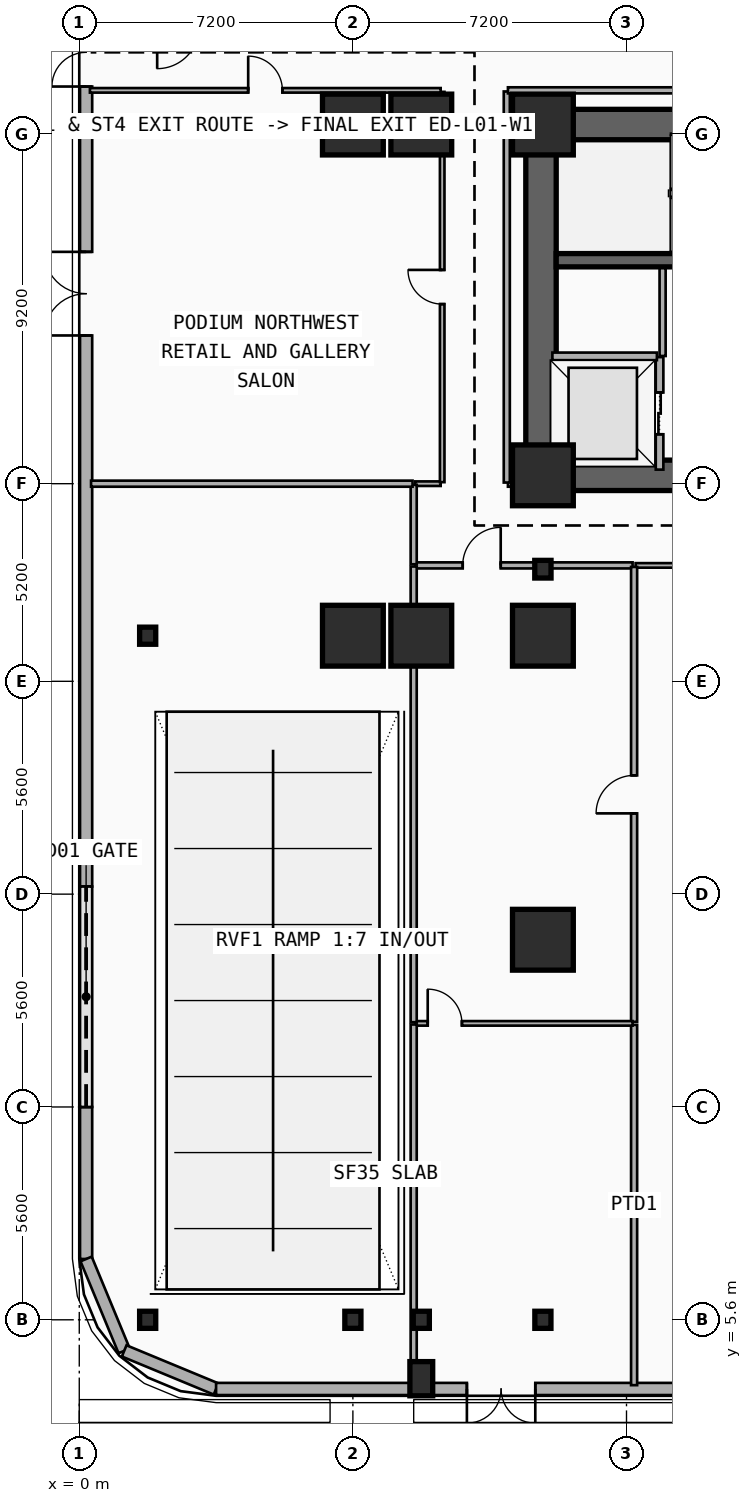
"""IFC4 building model, lengths in metres.
Left out: names, types, materials, properties, quantities, classifications, styles, units other than length and angle.
Written with IfcOpenShell. Run it as: python <this file> out.ifc"""

import sys

from ifc_helpers import new_model, si_unit, direction, frame, frame_2d, origin, origin_2d, place, context, subcontext, project, spatial, rectangle, i_section, extrude, element, fill, save


model = new_model("IFC4")
c1 = context("Model", 3, precision=1e-05, world=origin(), true_north=direction((0.0, 1.0)))
c2 = subcontext(c1, "Body", "Model", "MODEL_VIEW")
j1 = project(units=[si_unit("LENGTHUNIT", "METRE"), si_unit("PLANEANGLEUNIT", "RADIAN")], contexts=[c1])
p1 = place(None, origin())
s1 = spatial("IfcSite", under=j1, at=p1, CompositionType="ELEMENT")
p2 = place(p1, origin())
s2 = spatial("IfcBuilding", under=s1, at=p2, CompositionType="ELEMENT")
p3 = place(p2, origin())
s3 = spatial("IfcBuildingStorey", under=s2, at=p3, CompositionType="ELEMENT", Elevation=0.0)
p4 = place(p3, frame((12.15, 37.05, 0.0), z_axis=(0.0, 0.0, 1.0), x_axis=(1.0, 0.0, 0.0)))
e1 = element("IfcWall", 1, at=p4, inside=s3, PredefinedType="SHEAR", context=c2, shape_type="SweptSolid", body=[
    extrude(rectangle(XDim=33.23, YDim=0.8, at=frame_2d((16.615, 0.0))), origin(), (0.0, 0.0, 1.0), 5.4),
])
p5 = place(p3, frame((21.18, 27.82, 0.0), z_axis=(0.0, 0.0, 1.0), x_axis=(-1.0, 0.0, 0.0)))
e2 = element("IfcWall", 2, at=p5, inside=s3, PredefinedType="SHEAR", context=c2, shape_type="SweptSolid", body=[
    extrude(rectangle(XDim=9.03, YDim=0.8, at=frame_2d((4.515, 0.0))), origin(), (0.0, 0.0, 1.0), 5.4),
])
p6 = place(p5, frame((2.68, 0.0, 0.0)))
e3 = element("IfcOpeningElement", 3, at=p6, cuts=e2, PredefinedType="OPENING", context=c2, shape_type="SweptSolid", body=[
    extrude(rectangle(XDim=1.1, YDim=2.15, at=frame_2d((0.55, 1.075))), frame((0.0, 0.41, 0.0), z_axis=(0.0, -1.0, 0.0), x_axis=(1.0, 0.0, 0.0)), (0.0, 0.0, 1.0), 0.82),
])
p7 = place(p3, frame((12.15, 28.22, 0.0), z_axis=(0.0, 0.0, 1.0), x_axis=(0.0, 1.0, 0.0)))
e4 = element("IfcWall", 4, at=p7, inside=s3, PredefinedType="SHEAR", context=c2, shape_type="SweptSolid", body=[
    extrude(rectangle(XDim=8.43, YDim=0.8, at=frame_2d((4.215, 0.0))), origin(), (0.0, 0.0, 1.0), 5.4),
])
p8 = place(p3, frame((21.005, 33.48, 0.0), z_axis=(0.0, 0.0, 1.0), x_axis=(-1.0, 0.0, 0.0)))
e5 = element("IfcWall", 5, at=p8, inside=s3, PredefinedType="SHEAR", context=c2, shape_type="SweptSolid", body=[
    extrude(rectangle(XDim=8.455, YDim=0.35, at=frame_2d((4.228, 0.0))), origin(), (0.0, 0.0, 1.0), 5.4),
])
p9 = place(p8, frame((0.22, 0.0, 0.0)))
e6 = element("IfcOpeningElement", 6, at=p9, cuts=e5, PredefinedType="OPENING", context=c2, shape_type="SweptSolid", body=[
    extrude(rectangle(XDim=1.1, YDim=2.15, at=frame_2d((0.55, 1.075))), frame((0.0, 0.185, 0.0), z_axis=(0.0, -1.0, 0.0), x_axis=(1.0, 0.0, 0.0)), (0.0, 0.0, 1.0), 0.37),
])
for number, where, z_axis, x_axis in (
    (7, (12.2, 27.82, 0.0), (0.0, 0.0, 1.0), (1.0, 0.0, 0.0)),
    (8, (12.2, 37.05, 0.0), (0.0, 0.0, 1.0), (1.0, 0.0, 0.0)),
):
    element("IfcColumn", number, at=place(p3, frame(where, z_axis=z_axis, x_axis=x_axis)), inside=s3, PredefinedType="COLUMN", context=c2, shape_type="SweptSolid", body=[
        extrude(rectangle(XDim=1.6, YDim=1.6, at=origin_2d()), origin(), (0.0, 0.0, 1.0), 5.4),
    ])
p10 = place(p3, frame((12.2, 25.35, 0.0), z_axis=(0.0, 0.0, 1.0), x_axis=(1.0, 0.0, 0.0)))
e9 = element("IfcColumn", 9, at=p10, inside=s3, PredefinedType="COLUMN", context=c2, shape_type="SweptSolid", body=[
    extrude(i_section(OverallWidth=0.428, OverallDepth=0.465, WebThickness=0.045, FlangeThickness=0.073, FilletRadius=0.015, at=origin_2d()), origin(), (0.0, 0.0, 1.0), 5.4),
])
for number, where, z_axis, x_axis in (
    (10, (1.8, 5.6, 0.0), (0.0, 0.0, 1.0), (1.0, 0.0, 0.0)),
    (11, (1.8, 23.6, 0.0), (0.0, 0.0, 1.0), (1.0, 0.0, 0.0)),
    (12, (1.8, 37.05, 0.0), (0.0, 0.0, 1.0), (1.0, 0.0, 0.0)),
    (13, (7.2, 5.6, 0.0), (0.0, 0.0, 1.0), (1.0, 0.0, 0.0)),
):
    element("IfcColumn", number, at=place(p3, frame(where, z_axis=z_axis, x_axis=x_axis)), inside=s3, PredefinedType="COLUMN", context=c2, shape_type="SweptSolid", body=[
        extrude(i_section(OverallWidth=0.424, OverallDepth=0.45, WebThickness=0.041, FlangeThickness=0.065, FilletRadius=0.015, at=origin_2d()), origin(), (0.0, 0.0, 1.0), 5.4),
    ])
for number, where, z_axis, x_axis in (
    (14, (7.2, 23.6, 0.0), (0.0, 0.0, 1.0), (1.0, 0.0, 0.0)),
    (15, (7.2, 37.05, 0.0), (0.0, 0.0, 1.0), (1.0, 0.0, 0.0)),
):
    element("IfcColumn", number, at=place(p3, frame(where, z_axis=z_axis, x_axis=x_axis)), inside=s3, PredefinedType="COLUMN", context=c2, shape_type="SweptSolid", body=[
        extrude(rectangle(XDim=1.6, YDim=1.6, at=origin_2d()), origin(), (0.0, 0.0, 1.0), 5.4),
    ])
p11 = place(p3, frame((9.0, 5.6, 0.0), z_axis=(0.0, 0.0, 1.0), x_axis=(1.0, 0.0, 0.0)))
e16 = element("IfcColumn", 16, at=p11, inside=s3, PredefinedType="COLUMN", context=c2, shape_type="SweptSolid", body=[
    extrude(i_section(OverallWidth=0.424, OverallDepth=0.45, WebThickness=0.041, FlangeThickness=0.065, FilletRadius=0.015, at=origin_2d()), origin(), (0.0, 0.0, 1.0), 5.4),
])
for number, where, z_axis, x_axis in (
    (17, (9.0, 23.6, 0.0), (0.0, 0.0, 1.0), (1.0, 0.0, 0.0)),
    (18, (9.0, 37.05, 0.0), (0.0, 0.0, 1.0), (1.0, 0.0, 0.0)),
):
    element("IfcColumn", number, at=place(p3, frame(where, z_axis=z_axis, x_axis=x_axis)), inside=s3, PredefinedType="COLUMN", context=c2, shape_type="SweptSolid", body=[
        extrude(rectangle(XDim=1.6, YDim=1.6, at=origin_2d()), origin(), (0.0, 0.0, 1.0), 5.4),
    ])
p12 = place(p3, frame((12.2, 5.6, 0.0), z_axis=(0.0, 0.0, 1.0), x_axis=(1.0, 0.0, 0.0)))
e19 = element("IfcColumn", 19, at=p12, inside=s3, PredefinedType="COLUMN", context=c2, shape_type="SweptSolid", body=[
    extrude(i_section(OverallWidth=0.424, OverallDepth=0.45, WebThickness=0.041, FlangeThickness=0.065, FilletRadius=0.015, at=origin_2d()), origin(), (0.0, 0.0, 1.0), 5.4),
])
for number, where, z_axis, x_axis in (
    (20, (12.2, 15.6, 0.0), (0.0, 0.0, 1.0), (1.0, 0.0, 0.0)),
    (21, (12.2, 23.6, 0.0), (0.0, 0.0, 1.0), (1.0, 0.0, 0.0)),
):
    element("IfcColumn", number, at=place(p3, frame(where, z_axis=z_axis, x_axis=x_axis)), inside=s3, PredefinedType="COLUMN", context=c2, shape_type="SweptSolid", body=[
        extrude(rectangle(XDim=1.6, YDim=1.6, at=origin_2d()), origin(), (0.0, 0.0, 1.0), 5.4),
    ])
p13 = place(p3, frame((9.0, 4.05, 0.0), z_axis=(0.0, 0.0, 1.0), x_axis=(1.0, 0.0, 0.0)))
e22 = element("IfcColumn", 22, at=p13, inside=s3, PredefinedType="PILASTER", context=c2, shape_type="SweptSolid", body=[
    extrude(rectangle(XDim=0.6, YDim=0.9, at=origin_2d()), origin(), (0.0, 0.0, 1.0), 5.4),
])
p14 = place(p3, frame((0.18, 7.2, 0.0), z_axis=(0.0, 0.0, 1.0), x_axis=(0.0, 1.0, 0.0)))
e23 = element("IfcWall", 23, at=p14, inside=s3, PredefinedType="SOLIDWALL", context=c2, shape_type="SweptSolid", body=[
    extrude(rectangle(XDim=34.4, YDim=0.32, at=frame_2d((17.2, 0.0))), origin(), (0.0, 0.0, 1.0), 5.1),
])
p15 = place(p14, frame((4.0, 0.0, 0.0)))
e24 = element("IfcOpeningElement", 24, at=p15, cuts=e23, PredefinedType="OPENING", context=c2, shape_type="SweptSolid", body=[
    extrude(rectangle(XDim=5.8, YDim=2.8, at=frame_2d((2.9, 1.4))), frame((0.0, 0.17, 0.0), z_axis=(0.0, -1.0, 0.0), x_axis=(1.0, 0.0, 0.0)), (0.0, 0.0, 1.0), 0.34),
])
p16 = place(p14, frame((30.85, 0.0, 0.0)))
e25 = element("IfcOpeningElement", 25, at=p16, cuts=e23, PredefinedType="OPENING", context=c2, shape_type="SweptSolid", body=[
    extrude(rectangle(XDim=1.8, YDim=2.3, at=frame_2d((0.9, 1.15))), frame((0.0, 0.17, 0.0), z_axis=(0.0, -1.0, 0.0), x_axis=(1.0, 0.0, 0.0)), (0.0, 0.0, 1.0), 0.34),
])
p17 = place(p14, frame((24.3, 0.0, 0.0)))
e26 = element("IfcOpeningElement", 26, at=p17, cuts=e23, PredefinedType="OPENING", context=c2, shape_type="SweptSolid", body=[
    extrude(rectangle(XDim=2.2, YDim=2.4, at=frame_2d((1.1, 1.2))), frame((0.0, 0.17, 0.0), z_axis=(0.0, -1.0, 0.0), x_axis=(1.0, 0.0, 0.0)), (0.0, 0.0, 1.0), 0.34),
])
p18 = place(p3, frame((1.182, 4.782, 0.0), z_axis=(0.0, 0.0, 1.0), x_axis=(-0.382700522567, 0.923872453333, 0.0)))
e27 = element("IfcWall", 27, at=p18, inside=s3, PredefinedType="SOLIDWALL", context=c2, shape_type="SweptSolid", body=[
    extrude(rectangle(XDim=2.617, YDim=0.32, at=frame_2d((1.309, 0.0))), origin(), (0.0, 0.0, 1.0), 5.1),
])
p19 = place(p3, frame((3.6, 3.78, 0.0), z_axis=(0.0, 0.0, 1.0), x_axis=(-0.923886112352, 0.382667546838, 0.0)))
e28 = element("IfcWall", 28, at=p19, inside=s3, PredefinedType="SOLIDWALL", context=c2, shape_type="SweptSolid", body=[
    extrude(rectangle(XDim=2.618, YDim=0.32, at=frame_2d((1.309, 0.0))), origin(), (0.0, 0.0, 1.0), 5.1),
])
p20 = place(p3, frame((20.6, 3.78, 0.0), z_axis=(0.0, 0.0, 1.0), x_axis=(-1.0, 0.0, 0.0)))
e29 = element("IfcWall", 29, at=p20, inside=s3, PredefinedType="SOLIDWALL", context=c2, shape_type="SweptSolid", body=[
    extrude(rectangle(XDim=17.0, YDim=0.32, at=frame_2d((8.5, 0.0))), origin(), (0.0, 0.0, 1.0), 4.43),
])
p21 = place(p20, frame((0.9, 0.0, 0.0)))
e30 = element("IfcOpeningElement", 30, at=p21, cuts=e29, PredefinedType="OPENING", context=c2, shape_type="SweptSolid", body=[
    extrude(rectangle(XDim=2.2, YDim=2.4, at=frame_2d((1.1, 1.2))), frame((0.0, 0.17, 0.0), z_axis=(0.0, -1.0, 0.0), x_axis=(1.0, 0.0, 0.0)), (0.0, 0.0, 1.0), 0.34),
])
p22 = place(p20, frame((8.6, 0.0, 0.0)))
e31 = element("IfcOpeningElement", 31, at=p22, cuts=e29, PredefinedType="OPENING", context=c2, shape_type="SweptSolid", body=[
    extrude(rectangle(XDim=1.8, YDim=2.3, at=frame_2d((0.9, 1.15))), frame((0.0, 0.17, 0.0), z_axis=(0.0, -1.0, 0.0), x_axis=(1.0, 0.0, 0.0)), (0.0, 0.0, 1.0), 0.34),
])
p23 = place(p3, frame((15.27, 27.97, 0.0), z_axis=(0.0, 0.0, 1.0), x_axis=(0.0, 1.0, 0.0)))
e32 = element("IfcWall", 32, at=p23, inside=s3, PredefinedType="PARTITIONING", context=c2, shape_type="SweptSolid", body=[
    extrude(rectangle(XDim=2.96, YDim=0.2, at=frame_2d((1.48, 0.0))), origin(), (0.0, 0.0, 1.0), 4.072),
])
p24 = place(p23, frame((0.93, 0.0, 0.0)))
e33 = element("IfcOpeningElement", 33, at=p24, cuts=e32, PredefinedType="OPENING", context=c2, shape_type="SweptSolid", body=[
    extrude(rectangle(XDim=1.1, YDim=2.15, at=frame_2d((0.55, 1.075))), frame((0.0, 0.11, 0.0), z_axis=(0.0, -1.0, 0.0), x_axis=(1.0, 0.0, 0.0)), (0.0, 0.0, 1.0), 0.22),
])
p25 = place(p3, frame((12.45, 30.95, 0.0), z_axis=(0.0, 0.0, 1.0), x_axis=(1.0, 0.0, 0.0)))
e34 = element("IfcWall", 34, at=p25, inside=s3, PredefinedType="PARTITIONING", context=c2, shape_type="SweptSolid", body=[
    extrude(rectangle(XDim=2.75, YDim=0.2, at=frame_2d((1.375, 0.0))), origin(), (0.0, 0.0, 1.0), 4.072),
])
p26 = place(p3, frame((8.84, 27.6, 0.0), z_axis=(0.0, 0.0, 1.0), x_axis=(1.0, 0.0, 0.0)))
e35 = element("IfcWall", 35, at=p26, inside=s3, PredefinedType="PARTITIONING", context=c2, shape_type="SweptSolid", body=[
    extrude(rectangle(XDim=0.67, YDim=0.12, at=frame_2d((0.335, 0.0))), origin(), (0.0, 0.0, 1.0), 5.1),
])
p27 = place(p3, frame((14.64, 25.45, 0.0), z_axis=(0.0, 0.0, 1.0), x_axis=(1.0, 0.0, 0.0)))
e36 = element("IfcWall", 36, at=p27, inside=s3, PredefinedType="PARTITIONING", context=c2, shape_type="SweptSolid", body=[
    extrude(rectangle(XDim=21.67, YDim=0.12, at=frame_2d((10.835, 0.0))), origin(), (0.0, 0.0, 1.0), 4.266),
])
p28 = place(p27, frame((10.385, 0.0, 0.0)))
e37 = element("IfcOpeningElement", 37, at=p28, cuts=e36, PredefinedType="OPENING", context=c2, shape_type="SweptSolid", body=[
    extrude(rectangle(XDim=0.9, YDim=2.1, at=frame_2d((0.45, 1.05))), frame((0.0, 0.07, 0.0), z_axis=(0.0, -1.0, 0.0), x_axis=(1.0, 0.0, 0.0)), (0.0, 0.0, 1.0), 0.14),
])
p29 = place(p3, frame((8.84, 25.45, 0.0), z_axis=(0.0, 0.0, 1.0), x_axis=(1.0, 0.0, 0.0)))
e38 = element("IfcWall", 38, at=p29, inside=s3, PredefinedType="PARTITIONING", context=c2, shape_type="SweptSolid", body=[
    extrude(rectangle(XDim=5.72, YDim=0.16, at=frame_2d((2.86, 0.0))), origin(), (0.0, 0.0, 1.0), 4.266),
])
p30 = place(p29, frame((1.25, 0.0, 0.0)))
e39 = element("IfcOpeningElement", 39, at=p30, cuts=e38, PredefinedType="OPENING", context=c2, shape_type="SweptSolid", body=[
    extrude(rectangle(XDim=1.0, YDim=2.15, at=frame_2d((0.5, 1.075))), frame((0.0, 0.09, 0.0), z_axis=(0.0, -1.0, 0.0), x_axis=(1.0, 0.0, 0.0)), (0.0, 0.0, 1.0), 0.18),
])
p31 = place(p3, frame((9.55, 27.64, 0.0), z_axis=(0.0, 0.0, 1.0), x_axis=(0.0, 1.0, 0.0)))
e40 = element("IfcWall", 40, at=p31, inside=s3, PredefinedType="PARTITIONING", context=c2, shape_type="SweptSolid", body=[
    extrude(rectangle(XDim=10.27, YDim=0.12, at=frame_2d((5.135, 0.0))), origin(), (0.0, 0.0, 1.0), 5.1),
])
p32 = place(p31, frame((4.685, 0.0, 0.0)))
e41 = element("IfcOpeningElement", 41, at=p32, cuts=e40, PredefinedType="OPENING", context=c2, shape_type="SweptSolid", body=[
    extrude(rectangle(XDim=0.9, YDim=2.1, at=frame_2d((0.45, 1.05))), frame((0.0, 0.07, 0.0), z_axis=(0.0, -1.0, 0.0), x_axis=(1.0, 0.0, 0.0)), (0.0, 0.0, 1.0), 0.14),
])
p33 = place(p3, frame((0.28, 37.95, 0.0), z_axis=(0.0, 0.0, 1.0), x_axis=(1.0, 0.0, 0.0)))
e42 = element("IfcWall", 42, at=p33, inside=s3, PredefinedType="PARTITIONING", context=c2, shape_type="SweptSolid", body=[
    extrude(rectangle(XDim=9.23, YDim=0.12, at=frame_2d((4.615, 0.0))), origin(), (0.0, 0.0, 1.0), 5.1),
])
p34 = place(p33, frame((4.165, 0.0, 0.0)))
e43 = element("IfcOpeningElement", 43, at=p34, cuts=e42, PredefinedType="OPENING", context=c2, shape_type="SweptSolid", body=[
    extrude(rectangle(XDim=0.9, YDim=2.1, at=frame_2d((0.45, 1.05))), frame((0.0, 0.07, 0.0), z_axis=(0.0, -1.0, 0.0), x_axis=(1.0, 0.0, 0.0)), (0.0, 0.0, 1.0), 0.14),
])
p35 = place(p3, frame((14.6, 3.88, 0.0), z_axis=(0.0, 0.0, 1.0), x_axis=(0.0, 1.0, 0.0)))
e44 = element("IfcWall", 44, at=p35, inside=s3, PredefinedType="PARTITIONING", context=c2, shape_type="SweptSolid", body=[
    extrude(rectangle(XDim=9.48, YDim=0.16, at=frame_2d((4.74, 0.0))), origin(), (0.0, 0.0, 1.0), 4.43),
])
p36 = place(p3, frame((14.6, 13.44, 0.0), z_axis=(0.0, 0.0, 1.0), x_axis=(0.0, 1.0, 0.0)))
e45 = element("IfcWall", 45, at=p36, inside=s3, PredefinedType="PARTITIONING", context=c2, shape_type="SweptSolid", body=[
    extrude(rectangle(XDim=11.97, YDim=0.16, at=frame_2d((5.985, 0.0))), origin(), (0.0, 0.0, 1.0), 4.072),
])
p37 = place(p36, frame((5.485, 0.0, 0.0)))
e46 = element("IfcOpeningElement", 46, at=p37, cuts=e45, PredefinedType="OPENING", context=c2, shape_type="SweptSolid", body=[
    extrude(rectangle(XDim=1.0, YDim=2.15, at=frame_2d((0.5, 1.075))), frame((0.0, 0.09, 0.0), z_axis=(0.0, -1.0, 0.0), x_axis=(1.0, 0.0, 0.0)), (0.0, 0.0, 1.0), 0.18),
])
p38 = place(p3, frame((8.84, 13.4, 0.0), z_axis=(0.0, 0.0, 1.0), x_axis=(1.0, 0.0, 0.0)))
e47 = element("IfcWall", 47, at=p38, inside=s3, PredefinedType="PARTITIONING", context=c2, shape_type="SweptSolid", body=[
    extrude(rectangle(XDim=5.72, YDim=0.12, at=frame_2d((2.86, 0.0))), origin(), (0.0, 0.0, 1.0), 4.266),
])
p39 = place(p38, frame((0.329, 0.0, 0.0)))
e48 = element("IfcOpeningElement", 48, at=p39, cuts=e47, PredefinedType="OPENING", context=c2, shape_type="SweptSolid", body=[
    extrude(rectangle(XDim=0.9, YDim=2.1, at=frame_2d((0.45, 1.05))), frame((0.0, 0.07, 0.0), z_axis=(0.0, -1.0, 0.0), x_axis=(1.0, 0.0, 0.0)), (0.0, 0.0, 1.0), 0.14),
])
p40 = place(p3, frame((15.35, 30.96, 0.0), z_axis=(0.0, 0.0, 1.0), x_axis=(0.0, 1.0, 0.0)))
e49 = element("IfcWall", 49, at=p40, inside=s3, PredefinedType="PARTITIONING", context=c2, shape_type="SweptSolid", body=[
    extrude(rectangle(XDim=2.31, YDim=0.16, at=frame_2d((1.155, 0.0))), origin(), (0.0, 0.0, 1.0), 5.1),
])
p41 = place(p3, frame((11.28, 27.6, 0.0), z_axis=(0.0, 0.0, 1.0), x_axis=(1.0, 0.0, 0.0)))
e50 = element("IfcWall", 50, at=p41, inside=s3, PredefinedType="PARTITIONING", context=c2, shape_type="SweptSolid", body=[
    extrude(rectangle(XDim=0.84, YDim=0.16, at=frame_2d((0.42, 0.0))), origin(), (0.0, 0.0, 1.0), 4.072),
])
p42 = place(p3, frame((8.8, 25.48, 0.0), z_axis=(0.0, 0.0, 1.0), x_axis=(0.0, 1.0, 0.0)))
e51 = element("IfcWall", 51, at=p42, inside=s3, PredefinedType="PARTITIONING", context=c2, shape_type="SweptSolid", body=[
    extrude(rectangle(XDim=2.09, YDim=0.16, at=frame_2d((1.045, 0.0))), origin(), (0.0, 0.0, 1.0), 5.1),
])
p43 = place(p3, frame((11.25, 27.63, 0.0), z_axis=(0.0, 0.0, 1.0), x_axis=(0.0, 1.0, 0.0)))
e52 = element("IfcWall", 52, at=p43, inside=s3, PredefinedType="PARTITIONING", context=c2, shape_type="SweptSolid", body=[
    extrude(rectangle(XDim=10.29, YDim=0.16, at=frame_2d((5.145, 0.0))), origin(), (0.0, 0.0, 1.0), 5.1),
])
p44 = place(p3, frame((11.28, 37.95, 0.0), z_axis=(0.0, 0.0, 1.0), x_axis=(1.0, 0.0, 0.0)))
e53 = element("IfcWall", 53, at=p44, inside=s3, PredefinedType="PARTITIONING", context=c2, shape_type="SweptSolid", body=[
    extrude(rectangle(XDim=35.04, YDim=0.16, at=frame_2d((17.52, 0.0))), origin(), (0.0, 0.0, 1.0), 4.43),
])
p45 = place(p3, frame((0.31, 27.6, 0.0), z_axis=(0.0, 0.0, 1.0), x_axis=(1.0, 0.0, 0.0)))
e54 = element("IfcWall", 54, at=p45, inside=s3, PredefinedType="PARTITIONING", context=c2, shape_type="SweptSolid", body=[
    extrude(rectangle(XDim=8.46, YDim=0.16, at=frame_2d((4.23, 0.0))), origin(), (0.0, 0.0, 1.0), 5.1),
])
p46 = place(p3, frame((8.8, 3.91, 0.0), z_axis=(0.0, 0.0, 1.0), x_axis=(0.0, 1.0, 0.0)))
e55 = element("IfcWall", 55, at=p46, inside=s3, PredefinedType="PARTITIONING", context=c2, shape_type="SweptSolid", body=[
    extrude(rectangle(XDim=9.46, YDim=0.16, at=frame_2d((4.73, 0.0))), origin(), (0.0, 0.0, 1.0), 4.43),
])
p47 = place(p3, frame((8.8, 13.43, 0.0), z_axis=(0.0, 0.0, 1.0), x_axis=(0.0, 1.0, 0.0)))
e56 = element("IfcWall", 56, at=p47, inside=s3, PredefinedType="PARTITIONING", context=c2, shape_type="SweptSolid", body=[
    extrude(rectangle(XDim=11.99, YDim=0.16, at=frame_2d((5.995, 0.0))), origin(), (0.0, 0.0, 1.0), 4.43),
])
p48 = place(p15, origin())
e57 = element("IfcDoor", 57, at=p48, inside=s3, OperationType="ROLLINGUP", PredefinedType="GATE", context=c2, shape_type="SweptSolid", body=[
    extrude(rectangle(XDim=5.8, YDim=2.8, at=frame_2d((2.9, 1.4))), frame((0.0, 0.025, 0.0), z_axis=(0.0, -1.0, 0.0), x_axis=(1.0, 0.0, 0.0)), (0.0, 0.0, 1.0), 0.05),
])
fill(e24, e57)
p49 = place(p16, origin())
e58 = element("IfcDoor", 58, at=p49, inside=s3, OperationType="SINGLE_SWING_LEFT", PredefinedType="DOOR", context=c2, shape_type="SweptSolid", body=[
    extrude(rectangle(XDim=1.8, YDim=2.3, at=frame_2d((0.9, 1.15))), frame((0.0, 0.025, 0.0), z_axis=(0.0, -1.0, 0.0), x_axis=(1.0, 0.0, 0.0)), (0.0, 0.0, 1.0), 0.05),
])
fill(e25, e58)
p50 = place(p17, origin())
e59 = element("IfcDoor", 59, at=p50, inside=s3, OperationType="SINGLE_SWING_LEFT", PredefinedType="DOOR", context=c2, shape_type="SweptSolid", body=[
    extrude(rectangle(XDim=2.2, YDim=2.4, at=frame_2d((1.1, 1.2))), frame((0.0, 0.025, 0.0), z_axis=(0.0, -1.0, 0.0), x_axis=(1.0, 0.0, 0.0)), (0.0, 0.0, 1.0), 0.05),
])
fill(e26, e59)
p51 = place(p22, origin())
e60 = element("IfcDoor", 60, at=p51, inside=s3, OperationType="SINGLE_SWING_LEFT", PredefinedType="DOOR", context=c2, shape_type="SweptSolid", body=[
    extrude(rectangle(XDim=1.8, YDim=2.3, at=frame_2d((0.9, 1.15))), frame((0.0, 0.025, 0.0), z_axis=(0.0, -1.0, 0.0), x_axis=(1.0, 0.0, 0.0)), (0.0, 0.0, 1.0), 0.05),
])
fill(e31, e60)
p52 = place(p24, origin())
e61 = element("IfcDoor", 61, at=p52, inside=s3, OperationType="DOUBLE_DOOR_SLIDING", PredefinedType="DOOR", context=c2, shape_type="SweptSolid", body=[
    extrude(rectangle(XDim=1.1, YDim=2.15, at=frame_2d((0.55, 1.075))), frame((0.0, 0.025, 0.0), z_axis=(0.0, -1.0, 0.0), x_axis=(1.0, 0.0, 0.0)), (0.0, 0.0, 1.0), 0.05),
])
fill(e33, e61)
p53 = place(p30, origin())
e62 = element("IfcDoor", 62, at=p53, inside=s3, OperationType="SINGLE_SWING_RIGHT", PredefinedType="DOOR", context=c2, shape_type="SweptSolid", body=[
    extrude(rectangle(XDim=1.0, YDim=2.15, at=frame_2d((0.5, 1.075))), frame((0.0, 0.025, 0.0), z_axis=(0.0, -1.0, 0.0), x_axis=(1.0, 0.0, 0.0)), (0.0, 0.0, 1.0), 0.05),
])
fill(e39, e62)
p54 = place(p32, origin())
e63 = element("IfcDoor", 63, at=p54, inside=s3, OperationType="SINGLE_SWING_RIGHT", PredefinedType="DOOR", context=c2, shape_type="SweptSolid", body=[
    extrude(rectangle(XDim=0.9, YDim=2.1, at=frame_2d((0.45, 1.05))), frame((0.0, 0.025, 0.0), z_axis=(0.0, -1.0, 0.0), x_axis=(1.0, 0.0, 0.0)), (0.0, 0.0, 1.0), 0.05),
])
fill(e41, e63)
p55 = place(p34, origin())
e64 = element("IfcDoor", 64, at=p55, inside=s3, OperationType="SINGLE_SWING_LEFT", PredefinedType="DOOR", context=c2, shape_type="SweptSolid", body=[
    extrude(rectangle(XDim=0.9, YDim=2.1, at=frame_2d((0.45, 1.05))), frame((0.0, 0.025, 0.0), z_axis=(0.0, -1.0, 0.0), x_axis=(1.0, 0.0, 0.0)), (0.0, 0.0, 1.0), 0.05),
])
fill(e43, e64)
p56 = place(p37, origin())
e65 = element("IfcDoor", 65, at=p56, inside=s3, OperationType="SINGLE_SWING_LEFT", PredefinedType="DOOR", context=c2, shape_type="SweptSolid", body=[
    extrude(rectangle(XDim=1.0, YDim=2.15, at=frame_2d((0.5, 1.075))), frame((0.0, 0.025, 0.0), z_axis=(0.0, -1.0, 0.0), x_axis=(1.0, 0.0, 0.0)), (0.0, 0.0, 1.0), 0.05),
])
fill(e46, e65)
p57 = place(p39, origin())
e66 = element("IfcDoor", 66, at=p57, inside=s3, OperationType="SINGLE_SWING_LEFT", PredefinedType="DOOR", context=c2, shape_type="SweptSolid", body=[
    extrude(rectangle(XDim=0.9, YDim=2.1, at=frame_2d((0.45, 1.05))), frame((0.0, 0.025, 0.0), z_axis=(0.0, -1.0, 0.0), x_axis=(1.0, 0.0, 0.0)), (0.0, 0.0, 1.0), 0.05),
])
fill(e48, e66)
save(model, sys.argv[1])
